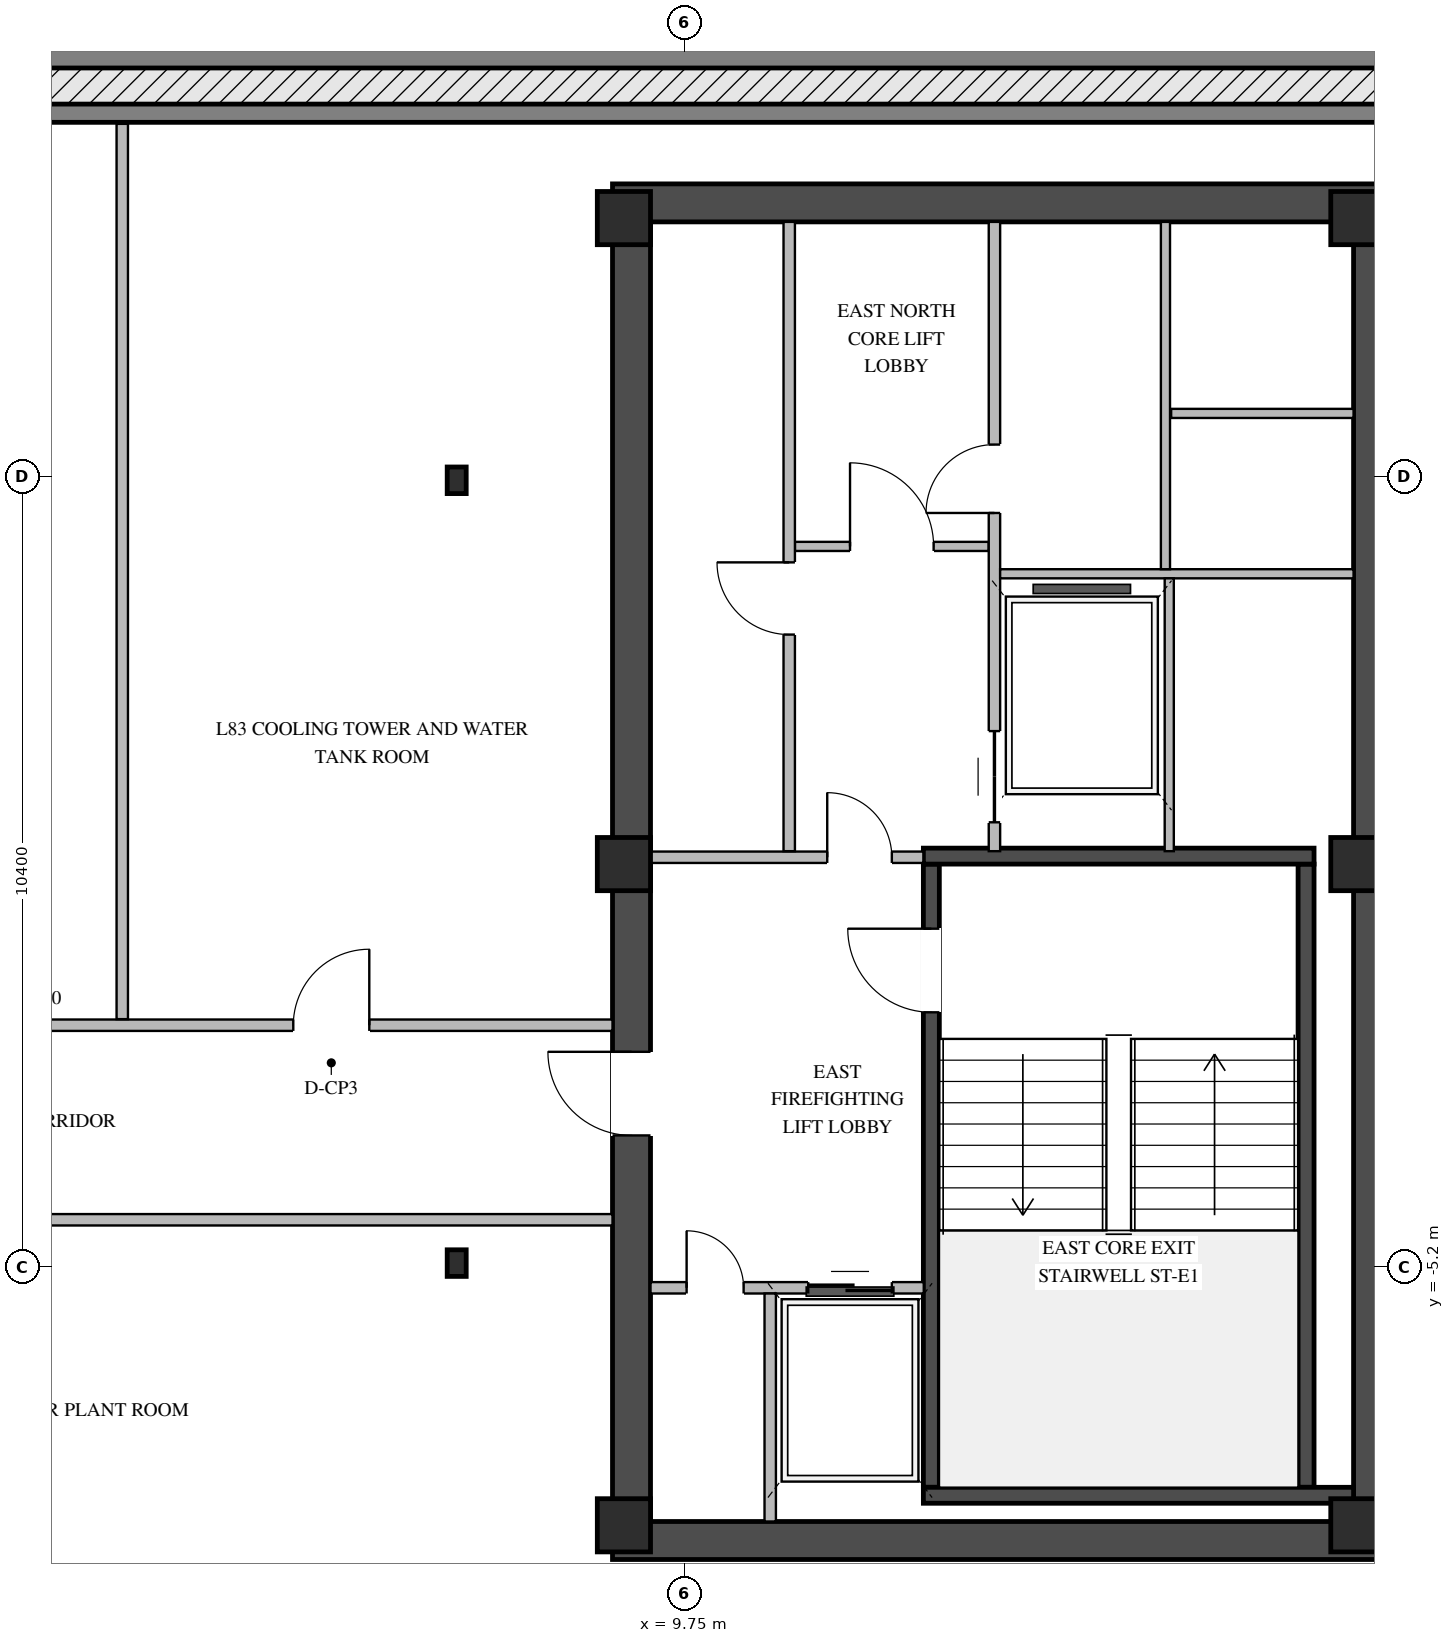
"""IFC4 building model, lengths in metres.
Left out: names, types, materials, properties, quantities, classifications, styles, units other than length and angle.
Written with IfcOpenShell. Run it as: python <this file> out.ifc"""

import sys

from ifc_helpers import new_model, si_unit, direction, frame, frame_2d, origin, origin_2d, place, context, subcontext, project, spatial, rectangle, i_section, extrude, element, fill, save


model = new_model("IFC4")
c1 = context("Model", 3, precision=1e-05, world=origin(), true_north=direction((0.0, 1.0)))
c2 = subcontext(c1, "Body", "Model", "MODEL_VIEW")
j1 = project(units=[si_unit("LENGTHUNIT", "METRE"), si_unit("PLANEANGLEUNIT", "RADIAN")], contexts=[c1])
p1 = place(None, origin())
s1 = spatial("IfcSite", under=j1, at=p1, CompositionType="ELEMENT")
p2 = place(p1, origin())
s2 = spatial("IfcBuilding", under=s1, at=p2, CompositionType="ELEMENT")
p3 = place(p2, frame((0.0, 0.0, 304.95)))
s3 = spatial("IfcBuildingStorey", under=s2, at=p3, CompositionType="ELEMENT", Elevation=304.95)
for number, where, z_axis, x_axis in (
    (1, (8.8, -8.8, 0.0), (0.0, 0.0, 1.0), (1.0, 0.0, 0.0)),
    (2, (8.8, 8.8, 0.0), (0.0, 0.0, 1.0), (1.0, 0.0, 0.0)),
):
    element("IfcWall", number, at=place(p3, frame(where, z_axis=z_axis, x_axis=x_axis)), inside=s3, PredefinedType="SHEAR", context=c2, shape_type="SweptSolid", body=[
        extrude(rectangle(XDim=10.25, YDim=0.5, at=frame_2d((5.125, 0.0))), origin(), (0.0, 0.0, 1.0), 3.35),
    ])
p4 = place(p3, frame((9.05, -8.55, 0.0), z_axis=(0.0, 0.0, 1.0), x_axis=(0.0, 1.0, 0.0)))
e3 = element("IfcWall", 3, at=p4, inside=s3, PredefinedType="SHEAR", context=c2, shape_type="SweptSolid", body=[
    extrude(rectangle(XDim=17.1, YDim=0.5, at=frame_2d((8.55, 0.0))), origin(), (0.0, 0.0, 1.0), 3.35),
])
p5 = place(p4, frame((5.08, 0.0, 0.0)))
e4 = element("IfcOpeningElement", 4, at=p5, cuts=e3, PredefinedType="OPENING", context=c2, shape_type="SweptSolid", body=[
    extrude(rectangle(XDim=1.1, YDim=2.08, at=frame_2d((0.55, 1.04))), frame((0.0, 0.26, 0.0), z_axis=(0.0, -1.0, 0.0), x_axis=(1.0, 0.0, 0.0)), (0.0, 0.0, 1.0), 0.52),
])
p6 = place(p3, frame((18.8, -8.55, 0.0), z_axis=(0.0, 0.0, 1.0), x_axis=(0.0, 1.0, 0.0)))
e5 = element("IfcWall", 5, at=p6, inside=s3, PredefinedType="SHEAR", context=c2, shape_type="SweptSolid", body=[
    extrude(rectangle(XDim=17.1, YDim=0.5, at=frame_2d((8.55, 0.0))), origin(), (0.0, 0.0, 1.0), 3.35),
])
p7 = place(p3, frame((12.995, -8.1, 0.0), z_axis=(0.0, 0.0, 1.0), x_axis=(0.0, 1.0, 0.0)))
e6 = element("IfcWall", 6, at=p7, inside=s3, PredefinedType="SHEAR", context=c2, shape_type="SweptSolid", body=[
    extrude(rectangle(XDim=8.2, YDim=0.21, at=frame_2d((4.1, 0.0))), origin(), (0.0, 0.0, 1.0), 3.35),
])
p8 = place(p7, frame((6.25, 0.0, 0.0)))
e7 = element("IfcOpeningElement", 7, at=p8, cuts=e6, PredefinedType="OPENING", context=c2, shape_type="SweptSolid", body=[
    extrude(rectangle(XDim=1.1, YDim=2.15, at=frame_2d((0.55, 1.075))), frame((0.0, 0.115, 0.0), z_axis=(0.0, -1.0, 0.0), x_axis=(1.0, 0.0, 0.0)), (0.0, 0.0, 1.0), 0.23),
])
p9 = place(p3, frame((17.925, -8.1, 0.0), z_axis=(0.0, 0.0, 1.0), x_axis=(0.0, 1.0, 0.0)))
e8 = element("IfcWall", 8, at=p9, inside=s3, PredefinedType="SHEAR", context=c2, shape_type="SweptSolid", body=[
    extrude(rectangle(XDim=8.2, YDim=0.21, at=frame_2d((4.1, 0.0))), origin(), (0.0, 0.0, 1.0), 3.35),
])
p10 = place(p3, frame((12.89, -8.205, 0.0), z_axis=(0.0, 0.0, 1.0), x_axis=(1.0, 0.0, 0.0)))
e9 = element("IfcWall", 9, at=p10, inside=s3, PredefinedType="SHEAR", context=c2, shape_type="SweptSolid", body=[
    extrude(rectangle(XDim=5.66, YDim=0.21, at=frame_2d((2.83, 0.0))), origin(), (0.0, 0.0, 1.0), 3.35),
])
p11 = place(p3, frame((18.03, 0.205, 0.0), z_axis=(0.0, 0.0, 1.0), x_axis=(-1.0, 0.0, 0.0)))
e10 = element("IfcWall", 10, at=p11, inside=s3, PredefinedType="SHEAR", context=c2, shape_type="SweptSolid", body=[
    extrude(rectangle(XDim=5.14, YDim=0.21, at=frame_2d((2.57, 0.0))), origin(), (0.0, 0.0, 1.0), 3.35),
])
for number, where, z_axis, x_axis in (
    (11, (8.95, -8.6, 0.0), (0.0, 0.0, 1.0), (1.0, 0.0, 0.0)),
    (12, (8.95, 0.1, 0.0), (0.0, 0.0, 1.0), (1.0, 0.0, 0.0)),
    (13, (8.95, 8.6, 0.0), (0.0, 0.0, 1.0), (1.0, 0.0, 0.0)),
    (14, (18.6, -8.6, 0.0), (0.0, 0.0, 1.0), (1.0, 0.0, 0.0)),
    (15, (18.6, 0.1, 0.0), (0.0, 0.0, 1.0), (1.0, 0.0, 0.0)),
    (16, (18.6, 8.6, 0.0), (0.0, 0.0, 1.0), (1.0, 0.0, 0.0)),
):
    element("IfcColumn", number, at=place(p3, frame(where, z_axis=z_axis, x_axis=x_axis)), inside=s3, PredefinedType="COLUMN", context=c2, shape_type="SweptSolid", body=[
        extrude(rectangle(XDim=0.7, YDim=0.7, at=origin_2d()), origin(), (0.0, 0.0, 1.0), 3.6),
    ])
for number, where, z_axis, x_axis in (
    (17, (6.75, -5.15, 0.0), (0.0, 0.0, 1.0), (1.0, 0.0, 0.0)),
    (18, (6.75, 5.15, 0.0), (0.0, 0.0, 1.0), (1.0, 0.0, 0.0)),
):
    element("IfcColumn", number, at=place(p3, frame(where, z_axis=z_axis, x_axis=x_axis)), inside=s3, PredefinedType="COLUMN", context=c2, shape_type="SweptSolid", body=[
        extrude(i_section(OverallWidth=0.25, OverallDepth=0.35, WebThickness=0.01, FlangeThickness=0.012, at=origin_2d()), origin(), (0.0, 0.0, 1.0), 3.6),
    ])
p12 = place(p3, frame((20.56, 9.98, 0.0), z_axis=(0.0, 0.0, 1.0), x_axis=(-1.0, 0.0, 0.0)))
e19 = element("IfcWall", 19, at=p12, inside=s3, PredefinedType="STANDARD", context=c2, shape_type="SweptSolid", body=[
    extrude(rectangle(XDim=40.72, YDim=0.24, at=frame_2d((20.36, 0.0))), origin(), (0.0, 0.0, 1.0), 3.33),
])
p13 = place(p3, frame((-20.05, 10.7, 0.0), z_axis=(0.0, 0.0, 1.0), x_axis=(1.0, 0.0, 0.0)))
e20 = element("IfcWall", 20, at=p13, inside=s3, PredefinedType="PARAPET", context=c2, shape_type="SweptSolid", body=[
    extrude(rectangle(XDim=41.1, YDim=0.25, at=frame_2d((20.55, 0.0))), origin(), (0.0, 0.0, 1.0), 1.2),
])
p14 = place(p3, frame((9.3, -5.475, 0.0), z_axis=(0.0, 0.0, 1.0), x_axis=(1.0, 0.0, 0.0)))
e21 = element("IfcWall", 21, at=p14, inside=s3, PredefinedType="STANDARD", context=c2, shape_type="SweptSolid", body=[
    extrude(rectangle(XDim=3.595, YDim=0.15, at=frame_2d((1.797, 0.0))), origin(), (0.0, 0.0, 1.0), 3.33),
])
p15 = place(p14, frame((2.075, 0.0, 0.0)))
e22 = element("IfcOpeningElement", 22, at=p15, cuts=e21, PredefinedType="OPENING", context=c2, shape_type="SweptSolid", body=[
    extrude(rectangle(XDim=1.1, YDim=2.15, at=frame_2d((0.55, 1.075))), frame((0.0, 0.085, 0.0), z_axis=(0.0, -1.0, 0.0), x_axis=(1.0, 0.0, 0.0)), (0.0, 0.0, 1.0), 0.17),
])
p16 = place(p14, frame((0.475, 0.0, 0.0)))
e23 = element("IfcOpeningElement", 23, at=p16, cuts=e21, PredefinedType="OPENING", context=c2, shape_type="SweptSolid", body=[
    extrude(rectangle(XDim=0.75, YDim=2.05, at=frame_2d((0.375, 1.025))), frame((0.0, 0.085, 0.0), z_axis=(0.0, -1.0, 0.0), x_axis=(1.0, 0.0, 0.0)), (0.0, 0.0, 1.0), 0.17),
])
p17 = place(p3, frame((10.875, -8.55, 0.0), z_axis=(0.0, 0.0, 1.0), x_axis=(0.0, 1.0, 0.0)))
e24 = element("IfcWall", 24, at=p17, inside=s3, PredefinedType="STANDARD", context=c2, shape_type="SweptSolid", body=[
    extrude(rectangle(XDim=3.0, YDim=0.15, at=frame_2d((1.5, 0.0))), origin(), (0.0, 0.0, 1.0), 3.33),
])
p18 = place(p3, frame((9.3, 0.19, 0.0), z_axis=(0.0, 0.0, 1.0), x_axis=(1.0, 0.0, 0.0)))
e25 = element("IfcWall", 25, at=p18, inside=s3, PredefinedType="STANDARD", context=c2, shape_type="SweptSolid", body=[
    extrude(rectangle(XDim=3.59, YDim=0.15, at=frame_2d((1.795, 0.0))), origin(), (0.0, 0.0, 1.0), 2.825),
])
p19 = place(p18, frame((2.325, 0.0, 0.0)))
e26 = element("IfcOpeningElement", 26, at=p19, cuts=e25, PredefinedType="OPENING", context=c2, shape_type="SweptSolid", body=[
    extrude(rectangle(XDim=0.85, YDim=2.04, at=frame_2d((0.425, 1.02))), frame((0.0, 0.085, 0.0), z_axis=(0.0, -1.0, 0.0), x_axis=(1.0, 0.0, 0.0)), (0.0, 0.0, 1.0), 0.17),
])
p20 = place(p3, frame((11.2, 4.28, 0.0), z_axis=(0.0, 0.0, 1.0), x_axis=(1.0, 0.0, 0.0)))
e27 = element("IfcWall", 27, at=p20, inside=s3, PredefinedType="STANDARD", context=c2, shape_type="SweptSolid", body=[
    extrude(rectangle(XDim=2.55, YDim=0.12, at=frame_2d((1.275, 0.0))), origin(), (0.0, 0.0, 1.0), 3.33),
])
p21 = place(p20, frame((0.725, 0.0, 0.0)))
e28 = element("IfcOpeningElement", 28, at=p21, cuts=e27, PredefinedType="OPENING", context=c2, shape_type="SweptSolid", body=[
    extrude(rectangle(XDim=1.1, YDim=2.1, at=frame_2d((0.55, 1.05))), frame((0.0, 0.07, 0.0), z_axis=(0.0, -1.0, 0.0), x_axis=(1.0, 0.0, 0.0)), (0.0, 0.0, 1.0), 0.14),
])
p22 = place(p3, frame((11.125, 0.27, 0.0), z_axis=(0.0, 0.0, 1.0), x_axis=(0.0, 1.0, 0.0)))
e29 = element("IfcWall", 29, at=p22, inside=s3, PredefinedType="STANDARD", context=c2, shape_type="SweptSolid", body=[
    extrude(rectangle(XDim=8.28, YDim=0.15, at=frame_2d((4.14, 0.0))), origin(), (0.0, 0.0, 1.0), 3.33),
])
p23 = place(p22, frame((2.85, 0.0, 0.0)))
e30 = element("IfcOpeningElement", 30, at=p23, cuts=e29, PredefinedType="OPENING", context=c2, shape_type="SweptSolid", body=[
    extrude(rectangle(XDim=0.95, YDim=2.05, at=frame_2d((0.475, 1.025))), frame((0.0, 0.085, 0.0), z_axis=(0.0, -1.0, 0.0), x_axis=(1.0, 0.0, 0.0)), (0.0, 0.0, 1.0), 0.17),
])
p24 = place(p3, frame((13.825, 0.27, 0.0), z_axis=(0.0, 0.0, 1.0), x_axis=(0.0, 1.0, 0.0)))
e31 = element("IfcWall", 31, at=p24, inside=s3, PredefinedType="STANDARD", context=c2, shape_type="SweptSolid", body=[
    extrude(rectangle(XDim=8.28, YDim=0.15, at=frame_2d((4.14, 0.0))), origin(), (0.0, 0.0, 1.0), 3.33),
])
p25 = place(p24, frame((4.45, 0.0, 0.0)))
e32 = element("IfcOpeningElement", 32, at=p25, cuts=e31, PredefinedType="OPENING", context=c2, shape_type="SweptSolid", body=[
    extrude(rectangle(XDim=0.9, YDim=2.05, at=frame_2d((0.45, 1.025))), frame((0.0, 0.085, 0.0), z_axis=(0.0, -1.0, 0.0), x_axis=(1.0, 0.0, 0.0)), (0.0, 0.0, 1.0), 0.17),
])
p26 = place(p24, frame((0.38, 0.0, 0.0)))
e33 = element("IfcOpeningElement", 33, at=p26, cuts=e31, PredefinedType="OPENING", context=c2, shape_type="SweptSolid", body=[
    extrude(rectangle(XDim=1.2, YDim=2.1, at=frame_2d((0.6, 1.05))), frame((0.0, 0.085, 0.0), z_axis=(0.0, -1.0, 0.0), x_axis=(1.0, 0.0, 0.0)), (0.0, 0.0, 1.0), 0.17),
])
p27 = place(p3, frame((13.9, 3.92, 0.0), z_axis=(0.0, 0.0, 1.0), x_axis=(1.0, 0.0, 0.0)))
e34 = element("IfcWall", 34, at=p27, inside=s3, PredefinedType="STANDARD", context=c2, shape_type="SweptSolid", body=[
    extrude(rectangle(XDim=4.65, YDim=0.12, at=frame_2d((2.325, 0.0))), origin(), (0.0, 0.0, 1.0), 3.33),
])
p28 = place(p3, frame((16.15, 6.03, 0.0), z_axis=(0.0, 0.0, 1.0), x_axis=(1.0, 0.0, 0.0)))
e35 = element("IfcWall", 35, at=p28, inside=s3, PredefinedType="STANDARD", context=c2, shape_type="SweptSolid", body=[
    extrude(rectangle(XDim=2.4, YDim=0.12, at=frame_2d((1.2, 0.0))), origin(), (0.0, 0.0, 1.0), 3.33),
])
p29 = place(p3, frame((16.075, 3.98, 0.0), z_axis=(0.0, 0.0, 1.0), x_axis=(0.0, 1.0, 0.0)))
e36 = element("IfcWall", 36, at=p29, inside=s3, PredefinedType="STANDARD", context=c2, shape_type="SweptSolid", body=[
    extrude(rectangle(XDim=4.57, YDim=0.12, at=frame_2d((2.285, 0.0))), origin(), (0.0, 0.0, 1.0), 3.33),
])
p30 = place(p3, frame((16.125, 0.27, 0.0), z_axis=(0.0, 0.0, 1.0), x_axis=(0.0, 1.0, 0.0)))
e37 = element("IfcWall", 37, at=p30, inside=s3, PredefinedType="STANDARD", context=c2, shape_type="SweptSolid", body=[
    extrude(rectangle(XDim=3.59, YDim=0.12, at=frame_2d((1.795, 0.0))), origin(), (0.0, 0.0, 1.0), 3.33),
])
p31 = place(p3, frame((-8.8, -2.02, 0.0), z_axis=(0.0, 0.0, 1.0), x_axis=(1.0, 0.0, 0.0)))
e38 = element("IfcWall", 38, at=p31, inside=s3, PredefinedType="STANDARD", context=c2, shape_type="SweptSolid", body=[
    extrude(rectangle(XDim=17.6, YDim=0.15, at=frame_2d((8.8, 0.0))), origin(), (0.0, 0.0, 1.0), 3.33),
])
p32 = place(p31, frame((4.6, 0.0, 0.0)))
e39 = element("IfcOpeningElement", 39, at=p32, cuts=e38, PredefinedType="OPENING", context=c2, shape_type="SweptSolid", body=[
    extrude(rectangle(XDim=1.0, YDim=2.02, at=frame_2d((0.5, 1.01))), frame((0.0, 0.085, 0.0), z_axis=(0.0, -1.0, 0.0), x_axis=(1.0, 0.0, 0.0)), (0.0, 0.0, 1.0), 0.17),
])
p33 = place(p31, frame((13.4, 0.0, 0.0)))
e40 = element("IfcOpeningElement", 40, at=p33, cuts=e38, PredefinedType="OPENING", context=c2, shape_type="SweptSolid", body=[
    extrude(rectangle(XDim=1.0, YDim=2.02, at=frame_2d((0.5, 1.01))), frame((0.0, 0.085, 0.0), z_axis=(0.0, -1.0, 0.0), x_axis=(1.0, 0.0, 0.0)), (0.0, 0.0, 1.0), 0.17),
])
p34 = place(p3, frame((2.35, -1.94, 0.0), z_axis=(0.0, 0.0, 1.0), x_axis=(0.0, 1.0, 0.0)))
e41 = element("IfcWall", 41, at=p34, inside=s3, PredefinedType="STANDARD", context=c2, shape_type="SweptSolid", body=[
    extrude(rectangle(XDim=11.78, YDim=0.15, at=frame_2d((5.89, 0.0))), origin(), (0.0, 0.0, 1.0), 3.33),
])
p35 = place(p3, frame((-8.8, -4.58, 0.0), z_axis=(0.0, 0.0, 1.0), x_axis=(1.0, 0.0, 0.0)))
e42 = element("IfcWall", 42, at=p35, inside=s3, PredefinedType="STANDARD", context=c2, shape_type="SweptSolid", body=[
    extrude(rectangle(XDim=17.6, YDim=0.15, at=frame_2d((8.8, 0.0))), origin(), (0.0, 0.0, 1.0), 3.33),
])
p36 = place(p35, frame((4.6, 0.0, 0.0)))
e43 = element("IfcOpeningElement", 43, at=p36, cuts=e42, PredefinedType="OPENING", context=c2, shape_type="SweptSolid", body=[
    extrude(rectangle(XDim=1.0, YDim=2.02, at=frame_2d((0.5, 1.01))), frame((0.0, 0.085, 0.0), z_axis=(0.0, -1.0, 0.0), x_axis=(1.0, 0.0, 0.0)), (0.0, 0.0, 1.0), 0.17),
])
p37 = place(p8, origin())
e44 = element("IfcDoor", 44, at=p37, inside=s3, OperationType="SINGLE_SWING_RIGHT", PredefinedType="DOOR", context=c2, shape_type="SweptSolid", body=[
    extrude(rectangle(XDim=1.1, YDim=2.15, at=frame_2d((0.55, 1.075))), frame((0.0, 0.025, 0.0), z_axis=(0.0, -1.0, 0.0), x_axis=(1.0, 0.0, 0.0)), (0.0, 0.0, 1.0), 0.05),
])
fill(e7, e44)
p38 = place(p15, origin())
e45 = element("IfcDoor", 45, at=p38, inside=s3, OperationType="DOUBLE_DOOR_SLIDING", PredefinedType="DOOR", context=c2, shape_type="SweptSolid", body=[
    extrude(rectangle(XDim=1.1, YDim=2.15, at=frame_2d((0.55, 1.075))), frame((0.0, 0.025, 0.0), z_axis=(0.0, -1.0, 0.0), x_axis=(1.0, 0.0, 0.0)), (0.0, 0.0, 1.0), 0.05),
])
fill(e22, e45)
p39 = place(p16, origin())
e46 = element("IfcDoor", 46, at=p39, inside=s3, OperationType="SINGLE_SWING_LEFT", PredefinedType="DOOR", context=c2, shape_type="SweptSolid", body=[
    extrude(rectangle(XDim=0.75, YDim=2.05, at=frame_2d((0.375, 1.025))), frame((0.0, 0.025, 0.0), z_axis=(0.0, -1.0, 0.0), x_axis=(1.0, 0.0, 0.0)), (0.0, 0.0, 1.0), 0.05),
])
fill(e23, e46)
p40 = place(p19, origin())
e47 = element("IfcDoor", 47, at=p40, inside=s3, OperationType="SINGLE_SWING_LEFT", PredefinedType="DOOR", context=c2, shape_type="SweptSolid", body=[
    extrude(rectangle(XDim=0.85, YDim=2.04, at=frame_2d((0.425, 1.02))), frame((0.0, 0.025, 0.0), z_axis=(0.0, -1.0, 0.0), x_axis=(1.0, 0.0, 0.0)), (0.0, 0.0, 1.0), 0.05),
])
fill(e26, e47)
p41 = place(p5, origin())
e48 = element("IfcDoor", 48, at=p41, inside=s3, OperationType="SINGLE_SWING_RIGHT", PredefinedType="DOOR", context=c2, shape_type="SweptSolid", body=[
    extrude(rectangle(XDim=1.1, YDim=2.08, at=frame_2d((0.55, 1.04))), frame((0.0, -0.155, 0.0), z_axis=(0.0, -1.0, 0.0), x_axis=(1.0, 0.0, 0.0)), (0.0, 0.0, 1.0), 0.05),
])
fill(e4, e48)
p42 = place(p21, origin())
e49 = element("IfcDoor", 49, at=p42, inside=s3, OperationType="SINGLE_SWING_LEFT", PredefinedType="DOOR", context=c2, shape_type="SweptSolid", body=[
    extrude(rectangle(XDim=1.1, YDim=2.1, at=frame_2d((0.55, 1.05))), frame((0.0, 0.025, 0.0), z_axis=(0.0, -1.0, 0.0), x_axis=(1.0, 0.0, 0.0)), (0.0, 0.0, 1.0), 0.05),
])
fill(e28, e49)
p43 = place(p23, origin())
e50 = element("IfcDoor", 50, at=p43, inside=s3, OperationType="SINGLE_SWING_RIGHT", PredefinedType="DOOR", context=c2, shape_type="SweptSolid", body=[
    extrude(rectangle(XDim=0.95, YDim=2.05, at=frame_2d((0.475, 1.025))), frame((0.0, 0.025, 0.0), z_axis=(0.0, -1.0, 0.0), x_axis=(1.0, 0.0, 0.0)), (0.0, 0.0, 1.0), 0.05),
])
fill(e30, e50)
p44 = place(p25, origin())
e51 = element("IfcDoor", 51, at=p44, inside=s3, OperationType="SINGLE_SWING_LEFT", PredefinedType="DOOR", context=c2, shape_type="SweptSolid", body=[
    extrude(rectangle(XDim=0.9, YDim=2.05, at=frame_2d((0.45, 1.025))), frame((0.0, 0.025, 0.0), z_axis=(0.0, -1.0, 0.0), x_axis=(1.0, 0.0, 0.0)), (0.0, 0.0, 1.0), 0.05),
])
fill(e32, e51)
p45 = place(p26, origin())
e52 = element("IfcDoor", 52, at=p45, inside=s3, OperationType="DOUBLE_DOOR_SLIDING", PredefinedType="DOOR", context=c2, shape_type="SweptSolid", body=[
    extrude(rectangle(XDim=1.2, YDim=2.1, at=frame_2d((0.6, 1.05))), frame((0.0, 0.025, 0.0), z_axis=(0.0, -1.0, 0.0), x_axis=(1.0, 0.0, 0.0)), (0.0, 0.0, 1.0), 0.05),
])
fill(e33, e52)
p46 = place(p33, origin())
e53 = element("IfcDoor", 53, at=p46, inside=s3, OperationType="SINGLE_SWING_RIGHT", PredefinedType="DOOR", context=c2, shape_type="SweptSolid", body=[
    extrude(rectangle(XDim=1.0, YDim=2.02, at=frame_2d((0.5, 1.01))), frame((0.0, 0.025, 0.0), z_axis=(0.0, -1.0, 0.0), x_axis=(1.0, 0.0, 0.0)), (0.0, 0.0, 1.0), 0.05),
])
fill(e40, e53)
save(model, sys.argv[1])
